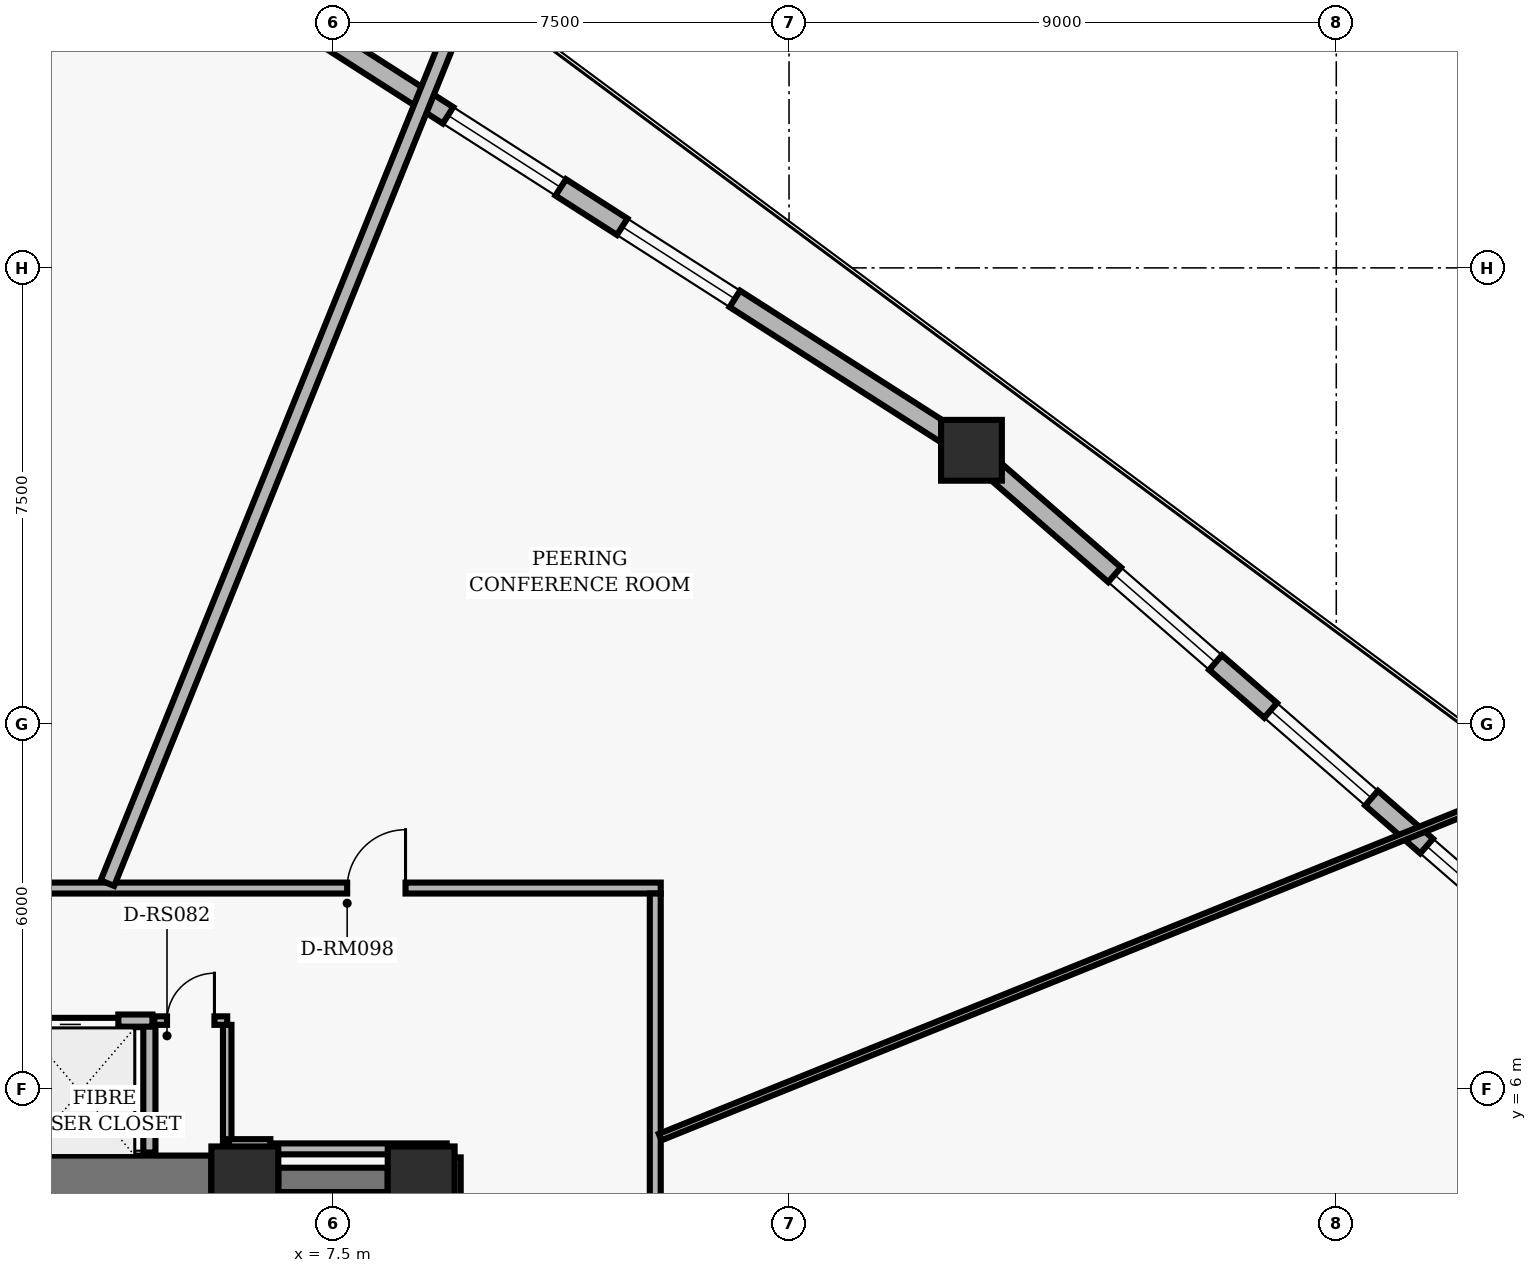
"""IFC4 building model, lengths in metres.
Left out: names, types, materials, properties, quantities, classifications, styles, units other than length and angle.
Written with IfcOpenShell. Run it as: python <this file> out.ifc"""

import sys

from ifc_helpers import new_model, si_unit, direction, frame, frame_2d, origin, origin_2d, place, context, subcontext, project, spatial, rectangle, hollow_rectangle, extrude, element, fill, save


model = new_model("IFC4")
c1 = context("Model", 3, precision=1e-05, world=origin(), true_north=direction((0.0, 1.0)))
c2 = subcontext(c1, "Body", "Model", "MODEL_VIEW")
j1 = project(units=[si_unit("LENGTHUNIT", "METRE"), si_unit("PLANEANGLEUNIT", "RADIAN")], contexts=[c1])
p1 = place(None, origin())
s1 = spatial("IfcSite", under=j1, at=p1, CompositionType="ELEMENT")
p2 = place(p1, origin())
s2 = spatial("IfcBuilding", under=s1, at=p2, CompositionType="ELEMENT")
p3 = place(p2, frame((0.0, 0.0, 15.36)))
s3 = spatial("IfcBuildingStorey", under=s2, at=p3, CompositionType="ELEMENT", Elevation=15.36)
for number, where, z_axis, x_axis in (
    (1, (6.05, 4.5, 0.0), (0.0, 0.0, 1.0), (1.0, 0.0, 0.0)),
    (2, (8.95, 4.5, 0.0), (0.0, 0.0, 1.0), (1.0, 0.0, 0.0)),
):
    element("IfcColumn", number, at=place(p3, frame(where, z_axis=z_axis, x_axis=x_axis)), inside=s3, PredefinedType="COLUMN", context=c2, shape_type="SweptSolid", body=[
        extrude(hollow_rectangle(XDim=1.1, YDim=1.1, WallThickness=0.07, InnerFilletRadius=0.02, OuterFilletRadius=0.04, at=origin_2d()), origin(), (0.0, 0.0, 1.0), 3.52),
    ])
p4 = place(p3, frame((2.05, 4.5, 0.0), z_axis=(0.0, 0.0, 1.0), x_axis=(1.0, 0.0, 0.0)))
e3 = element("IfcWall", 3, at=p4, inside=s3, PredefinedType="SHEAR", context=c2, shape_type="SweptSolid", body=[
    extrude(rectangle(XDim=3.45, YDim=0.8, at=frame_2d((1.725, 0.0))), origin(), (0.0, 0.0, 1.0), 3.098),
])
p5 = place(p3, frame((6.6, 4.5, 0.0), z_axis=(0.0, 0.0, 1.0), x_axis=(1.0, 0.0, 0.0)))
e4 = element("IfcWall", 4, at=p5, inside=s3, PredefinedType="SHEAR", context=c2, shape_type="SweptSolid", body=[
    extrude(rectangle(XDim=1.8, YDim=0.4, at=frame_2d((0.9, 0.0))), origin(), (0.0, 0.0, 1.0), 3.098),
])
p6 = place(p3, frame((18.0, 16.5, 0.0), z_axis=(0.0, 0.0, 1.0), x_axis=(1.0, 0.0, 0.0)))
e5 = element("IfcColumn", 5, at=p6, inside=s3, PredefinedType="COLUMN", context=c2, shape_type="SweptSolid", body=[
    extrude(rectangle(XDim=1.0, YDim=1.0, at=origin_2d()), origin(), (0.0, 0.0, 1.0), 3.52),
])
p7 = place(p3, frame((18.392, 16.159, 0.0), z_axis=(0.0, 0.0, 1.0), x_axis=(0.754615886195, -0.656166796098, 0.0)))
e6 = element("IfcWall", 6, at=p7, inside=s3, PredefinedType="SOLIDWALL", context=c2, shape_type="SweptSolid", body=[
    extrude(rectangle(XDim=14.2, YDim=0.32, at=frame_2d((7.1, 0.0))), origin(), (0.0, 0.0, 1.0), 1.65),
])
p8 = place(p7, frame((2.6, 0.0, 0.4)))
e7 = element("IfcOpeningElement", 7, at=p8, cuts=e6, PredefinedType="OPENING", context=c2, shape_type="SweptSolid", body=[
    extrude(rectangle(XDim=2.2, YDim=1.1, at=frame_2d((1.1, 0.55))), frame((0.0, 0.17, 0.0), z_axis=(0.0, -1.0, 0.0), x_axis=(1.0, 0.0, 0.0)), (0.0, 0.0, 1.0), 0.34),
])
p9 = place(p7, frame((6.0, 0.0, 0.4)))
e8 = element("IfcOpeningElement", 8, at=p9, cuts=e6, PredefinedType="OPENING", context=c2, shape_type="SweptSolid", body=[
    extrude(rectangle(XDim=2.2, YDim=1.1, at=frame_2d((1.1, 0.55))), frame((0.0, 0.17, 0.0), z_axis=(0.0, -1.0, 0.0), x_axis=(1.0, 0.0, 0.0)), (0.0, 0.0, 1.0), 0.34),
])
p10 = place(p7, frame((9.4, 0.0, 0.4)))
e9 = element("IfcOpeningElement", 9, at=p10, cuts=e6, PredefinedType="OPENING", context=c2, shape_type="SweptSolid", body=[
    extrude(rectangle(XDim=2.2, YDim=1.1, at=frame_2d((1.1, 0.55))), frame((0.0, 0.17, 0.0), z_axis=(0.0, -1.0, 0.0), x_axis=(1.0, 0.0, 0.0)), (0.0, 0.0, 1.0), 0.34),
])
p11 = place(p3, frame((5.938, 24.22, 0.0), z_axis=(0.0, 0.0, 1.0), x_axis=(0.842268830443, -0.539057712368, 0.0)))
e10 = element("IfcWall", 10, at=p11, inside=s3, PredefinedType="SOLIDWALL", context=c2, shape_type="SweptSolid", body=[
    extrude(rectangle(XDim=13.801, YDim=0.32, at=frame_2d((6.9, 0.0))), origin(), (0.0, 0.0, 1.0), 1.65),
])
p12 = place(p11, frame((4.1, 0.0, 0.4)))
e11 = element("IfcOpeningElement", 11, at=p12, cuts=e10, PredefinedType="OPENING", context=c2, shape_type="SweptSolid", body=[
    extrude(rectangle(XDim=2.2, YDim=1.1, at=frame_2d((1.1, 0.55))), frame((0.0, 0.17, 0.0), z_axis=(0.0, -1.0, 0.0), x_axis=(1.0, 0.0, 0.0)), (0.0, 0.0, 1.0), 0.34),
])
p13 = place(p11, frame((7.5, 0.0, 0.4)))
e12 = element("IfcOpeningElement", 12, at=p13, cuts=e10, PredefinedType="OPENING", context=c2, shape_type="SweptSolid", body=[
    extrude(rectangle(XDim=2.2, YDim=1.1, at=frame_2d((1.1, 0.55))), frame((0.0, 0.17, 0.0), z_axis=(0.0, -1.0, 0.0), x_axis=(1.0, 0.0, 0.0)), (0.0, 0.0, 1.0), 0.34),
])
p14 = place(p3, frame((4.48, 4.95, 0.0), z_axis=(0.0, 0.0, 1.0), x_axis=(0.0, 1.0, 0.0)))
e13 = element("IfcWall", 13, at=p14, inside=s3, PredefinedType="PARTITIONING", context=c2, shape_type="SweptSolid", body=[
    extrude(rectangle(XDim=2.1, YDim=0.2, at=frame_2d((1.05, 0.0))), origin(), (0.0, 0.0, 1.0), 3.073),
])
p15 = place(p3, frame((2.15, 7.12, 0.0), z_axis=(0.0, 0.0, 1.0), x_axis=(1.0, 0.0, 0.0)))
e14 = element("IfcWall", 14, at=p15, inside=s3, PredefinedType="PARTITIONING", context=c2, shape_type="SweptSolid", body=[
    extrude(rectangle(XDim=2.38, YDim=0.2, at=frame_2d((1.19, 0.0))), origin(), (0.0, 0.0, 1.0), 2.587),
])
p16 = place(p15, frame((0.56, 0.0, 0.0)))
e15 = element("IfcOpeningElement", 15, at=p16, cuts=e14, PredefinedType="OPENING", context=c2, shape_type="SweptSolid", body=[
    extrude(rectangle(XDim=1.26, YDim=2.06, at=frame_2d((0.63, 1.03))), frame((0.0, 0.11, 0.0), z_axis=(0.0, -1.0, 0.0), x_axis=(1.0, 0.0, 0.0)), (0.0, 0.0, 1.0), 0.22),
])
p17 = place(p3, frame((5.76, 4.95, 0.0), z_axis=(0.0, 0.0, 1.0), x_axis=(0.0, 1.0, 0.0)))
e16 = element("IfcWall", 16, at=p17, inside=s3, PredefinedType="PARTITIONING", context=c2, shape_type="SweptSolid", body=[
    extrude(rectangle(XDim=2.1, YDim=0.14, at=frame_2d((1.05, 0.0))), origin(), (0.0, 0.0, 1.0), 2.198),
])
p18 = place(p3, frame((4.56, 7.12, 0.0), z_axis=(0.0, 0.0, 1.0), x_axis=(1.0, 0.0, 0.0)))
e17 = element("IfcWall", 17, at=p18, inside=s3, PredefinedType="PARTITIONING", context=c2, shape_type="SweptSolid", body=[
    extrude(rectangle(XDim=1.2, YDim=0.14, at=frame_2d((0.6, 0.0))), origin(), (0.0, 0.0, 1.0), 2.587),
])
p19 = place(p18, frame((0.21, 0.0, 0.0)))
e18 = element("IfcOpeningElement", 18, at=p19, cuts=e17, PredefinedType="OPENING", context=c2, shape_type="SweptSolid", body=[
    extrude(rectangle(XDim=0.78, YDim=2.01, at=frame_2d((0.39, 1.005))), frame((0.0, 0.08, 0.0), z_axis=(0.0, -1.0, 0.0), x_axis=(1.0, 0.0, 0.0)), (0.0, 0.0, 1.0), 0.16),
])
p20 = place(p3, frame((-12.89, 9.3, 0.0), z_axis=(0.0, 0.0, 1.0), x_axis=(1.0, 0.0, 0.0)))
e19 = element("IfcWall", 19, at=p20, inside=s3, PredefinedType="PARTITIONING", context=c2, shape_type="SweptSolid", body=[
    extrude(rectangle(XDim=25.78, YDim=0.18, at=frame_2d((12.89, 0.0))), origin(), (0.0, 0.0, 1.0), 2.587),
])
p21 = place(p20, frame((20.623, 0.0, 0.0)))
e20 = element("IfcOpeningElement", 20, at=p21, cuts=e19, PredefinedType="OPENING", context=c2, shape_type="SweptSolid", body=[
    extrude(rectangle(XDim=0.96, YDim=2.02, at=frame_2d((0.48, 1.01))), frame((0.0, 0.1, 0.0), z_axis=(0.0, -1.0, 0.0), x_axis=(1.0, 0.0, 0.0)), (0.0, 0.0, 1.0), 0.2),
])
p22 = place(p20, frame((12.66, 0.0, 0.0)))
e21 = element("IfcOpeningElement", 21, at=p22, cuts=e19, PredefinedType="OPENING", context=c2, shape_type="SweptSolid", body=[
    extrude(rectangle(XDim=1.02, YDim=2.02, at=frame_2d((0.51, 1.01))), frame((0.0, 0.1, 0.0), z_axis=(0.0, -1.0, 0.0), x_axis=(1.0, 0.0, 0.0)), (0.0, 0.0, 1.0), 0.2),
])
p23 = place(p20, frame((4.478, 0.0, 0.0)))
e22 = element("IfcOpeningElement", 22, at=p23, cuts=e19, PredefinedType="OPENING", context=c2, shape_type="SweptSolid", body=[
    extrude(rectangle(XDim=0.96, YDim=2.02, at=frame_2d((0.48, 1.01))), frame((0.0, 0.1, 0.0), z_axis=(0.0, -1.0, 0.0), x_axis=(1.0, 0.0, 0.0)), (0.0, 0.0, 1.0), 0.2),
])
p24 = place(p3, frame((12.8, 9.21, 0.0), z_axis=(0.0, 0.0, 1.0), x_axis=(0.0, -1.0, 0.0)))
e23 = element("IfcWall", 23, at=p24, inside=s3, PredefinedType="PARTITIONING", context=c2, shape_type="SweptSolid", body=[
    extrude(rectangle(XDim=7.62, YDim=0.18, at=frame_2d((3.81, 0.0))), origin(), (0.0, 0.0, 1.0), 3.073),
])
p25 = place(p3, frame((9.51, -4.87, 0.0), z_axis=(0.0, 0.0, 1.0), x_axis=(0.0, 1.0, 0.0)))
e24 = element("IfcWall", 24, at=p25, inside=s3, PredefinedType="PARTITIONING", context=c2, shape_type="SweptSolid", body=[
    extrude(rectangle(XDim=9.74, YDim=0.18, at=frame_2d((4.87, 0.0))), origin(), (0.0, 0.0, 1.0), 3.073),
])
p26 = place(p3, frame((9.37, 5.01, 0.0), z_axis=(0.0, 0.0, 1.0), x_axis=(-1.0, 0.0, 0.0)))
e25 = element("IfcWall", 25, at=p26, inside=s3, PredefinedType="PARTITIONING", context=c2, shape_type="SweptSolid", body=[
    extrude(rectangle(XDim=2.808, YDim=0.18, at=frame_2d((1.404, 0.0))), origin(), (0.0, 0.0, 1.0), 3.073),
])
p27 = place(p3, frame((6.47, 5.08, 0.0), z_axis=(0.0, 0.0, 1.0), x_axis=(-1.0, 0.0, 0.0)))
e26 = element("IfcWall", 26, at=p27, inside=s3, PredefinedType="PARTITIONING", context=c2, shape_type="SweptSolid", body=[
    extrude(rectangle(XDim=0.68, YDim=0.18, at=frame_2d((0.34, 0.0))), origin(), (0.0, 0.0, 1.0), 3.073),
])
p28 = place(p3, frame((12.88, 5.204, 0.0), z_axis=(0.0, 0.0, 1.0), x_axis=(0.927184819219, 0.374604205809, 0.0)))
e27 = element("IfcWall", 27, at=p28, inside=s3, PredefinedType="MOVABLE", context=c2, shape_type="SweptSolid", body=[
    extrude(rectangle(XDim=15.642, YDim=0.115, at=frame_2d((7.821, 0.0))), origin(), (0.0, 0.0, 1.0), 1.893),
])
p29 = place(p3, frame((3.79, 9.38, 0.0), z_axis=(0.0, 0.0, 1.0), x_axis=(0.374596599421, 0.92718789234, 0.0)))
e28 = element("IfcWall", 28, at=p29, inside=s3, PredefinedType="PARTITIONING", context=c2, shape_type="SweptSolid", body=[
    extrude(rectangle(XDim=15.929, YDim=0.24, at=frame_2d((7.964, 0.0))), origin(), (0.0, 0.0, 1.0), 3.073),
])
p30 = place(p8, origin())
e29 = element("IfcWindow", 29, at=p30, inside=s3, PartitioningType="SINGLE_PANEL", PredefinedType="WINDOW", context=c2, shape_type="SweptSolid", body=[
    extrude(rectangle(XDim=2.2, YDim=1.1, at=frame_2d((1.1, 0.55))), frame((0.0, 0.03, 0.0), z_axis=(0.0, -1.0, 0.0), x_axis=(1.0, 0.0, 0.0)), (0.0, 0.0, 1.0), 0.06),
])
fill(e7, e29)
p31 = place(p9, origin())
e30 = element("IfcWindow", 30, at=p31, inside=s3, PartitioningType="SINGLE_PANEL", PredefinedType="WINDOW", context=c2, shape_type="SweptSolid", body=[
    extrude(rectangle(XDim=2.2, YDim=1.1, at=frame_2d((1.1, 0.55))), frame((0.0, 0.03, 0.0), z_axis=(0.0, -1.0, 0.0), x_axis=(1.0, 0.0, 0.0)), (0.0, 0.0, 1.0), 0.06),
])
fill(e8, e30)
p32 = place(p10, origin())
e31 = element("IfcWindow", 31, at=p32, inside=s3, PartitioningType="SINGLE_PANEL", PredefinedType="WINDOW", context=c2, shape_type="SweptSolid", body=[
    extrude(rectangle(XDim=2.2, YDim=1.1, at=frame_2d((1.1, 0.55))), frame((0.0, 0.03, 0.0), z_axis=(0.0, -1.0, 0.0), x_axis=(1.0, 0.0, 0.0)), (0.0, 0.0, 1.0), 0.06),
])
fill(e9, e31)
p33 = place(p12, origin())
e32 = element("IfcWindow", 32, at=p33, inside=s3, PartitioningType="SINGLE_PANEL", PredefinedType="WINDOW", context=c2, shape_type="SweptSolid", body=[
    extrude(rectangle(XDim=2.2, YDim=1.1, at=frame_2d((1.1, 0.55))), frame((0.0, 0.03, 0.0), z_axis=(0.0, -1.0, 0.0), x_axis=(1.0, 0.0, 0.0)), (0.0, 0.0, 1.0), 0.06),
])
fill(e11, e32)
p34 = place(p13, origin())
e33 = element("IfcWindow", 33, at=p34, inside=s3, PartitioningType="SINGLE_PANEL", PredefinedType="WINDOW", context=c2, shape_type="SweptSolid", body=[
    extrude(rectangle(XDim=2.2, YDim=1.1, at=frame_2d((1.1, 0.55))), frame((0.0, 0.03, 0.0), z_axis=(0.0, -1.0, 0.0), x_axis=(1.0, 0.0, 0.0)), (0.0, 0.0, 1.0), 0.06),
])
fill(e12, e33)
p35 = place(p16, origin())
e34 = element("IfcDoor", 34, at=p35, inside=s3, OperationType="SLIDING_TO_LEFT", PredefinedType="DOOR", context=c2, shape_type="SweptSolid", body=[
    extrude(rectangle(XDim=1.26, YDim=2.06, at=frame_2d((0.63, 1.03))), frame((0.0, 0.025, 0.0), z_axis=(0.0, -1.0, 0.0), x_axis=(1.0, 0.0, 0.0)), (0.0, 0.0, 1.0), 0.05),
])
fill(e15, e34)
p36 = place(p19, origin())
e35 = element("IfcDoor", 35, at=p36, inside=s3, OperationType="SINGLE_SWING_RIGHT", PredefinedType="DOOR", context=c2, shape_type="SweptSolid", body=[
    extrude(rectangle(XDim=0.78, YDim=2.01, at=frame_2d((0.39, 1.005))), frame((0.0, 0.025, 0.0), z_axis=(0.0, -1.0, 0.0), x_axis=(1.0, 0.0, 0.0)), (0.0, 0.0, 1.0), 0.05),
])
fill(e18, e35)
p37 = place(p21, origin())
e36 = element("IfcDoor", 36, at=p37, inside=s3, OperationType="SINGLE_SWING_RIGHT", PredefinedType="DOOR", context=c2, shape_type="SweptSolid", body=[
    extrude(rectangle(XDim=0.96, YDim=2.02, at=frame_2d((0.48, 1.01))), frame((0.0, 0.025, 0.0), z_axis=(0.0, -1.0, 0.0), x_axis=(1.0, 0.0, 0.0)), (0.0, 0.0, 1.0), 0.05),
])
fill(e20, e36)
save(model, sys.argv[1])
